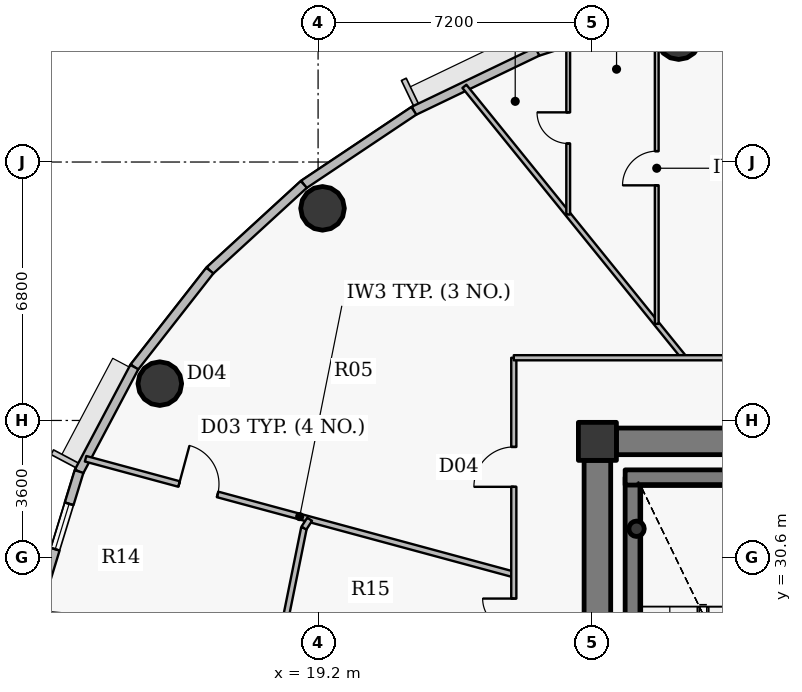
"""IFC4 building model, lengths in metres.
Left out: names, types, materials, properties, quantities, classifications, styles, units other than length and angle.
Written with IfcOpenShell. Run it as: python <this file> out.ifc"""

import sys

from ifc_helpers import new_model, si_unit, direction, frame, frame_2d, origin, origin_2d, place, context, subcontext, project, spatial, rectangle, hollow_circle, extrude, source, transform, mapped, element, fill, save


model = new_model("IFC4")
c1 = context("Model", 3, precision=1e-05, world=origin(), true_north=direction((0.0, 1.0)))
c2 = subcontext(c1, "Body", "Model", "MODEL_VIEW")
j1 = project(units=[si_unit("LENGTHUNIT", "METRE"), si_unit("PLANEANGLEUNIT", "RADIAN")], contexts=[c1])
p1 = place(None, origin())
s1 = spatial("IfcSite", under=j1, at=p1, CompositionType="ELEMENT")
p2 = place(p1, origin())
s2 = spatial("IfcBuilding", under=s1, at=p2, CompositionType="ELEMENT")
p3 = place(p2, frame((0.0, 0.0, 244.05)))
s3 = spatial("IfcBuildingStorey", under=s2, at=p3, CompositionType="ELEMENT", Elevation=244.05)
p4 = place(p3, frame((26.55, 33.65, 0.0), z_axis=(0.0, 0.0, 1.0), x_axis=(1.0, 0.0, 0.0)))
e1 = element("IfcColumn", 1, at=p4, inside=s3, PredefinedType="COLUMN", context=c2, shape_type="SweptSolid", body=[
    extrude(rectangle(XDim=1.0, YDim=1.0, at=origin_2d()), origin(), (0.0, 0.0, 1.0), 3.75),
])
p5 = place(p3, frame((27.48, 24.1, 0.0), z_axis=(0.0, 0.0, 1.0), x_axis=(0.0, 1.0, 0.0)))
e2 = element("IfcWall", 2, at=p5, inside=s3, PredefinedType="SHEAR", context=c2, shape_type="SweptSolid", body=[
    extrude(rectangle(XDim=8.6, YDim=0.4, at=frame_2d((4.3, 0.0))), origin(), (0.0, 0.0, 1.0), 3.75),
])
p6 = place(p3, frame((27.28, 32.7, 0.0), z_axis=(0.0, 0.0, 1.0), x_axis=(1.0, 0.0, 0.0)))
e3 = element("IfcWall", 3, at=p6, inside=s3, PredefinedType="SHEAR", context=c2, shape_type="SweptSolid", body=[
    extrude(rectangle(XDim=4.1, YDim=0.4, at=frame_2d((2.05, 0.0))), origin(), (0.0, 0.0, 1.0), 3.75),
])
p7 = place(p3, frame((27.58, 31.35, 0.0), z_axis=(0.0, 0.0, 1.0), x_axis=(1.0, 0.0, 0.0)))
e4 = element("IfcColumn", 4, at=p7, inside=s3, PredefinedType="COLUMN", context=c2, shape_type="SweptSolid", body=[
    extrude(hollow_circle(Radius=0.203, WallThickness=0.016, at=origin_2d()), origin(), (0.0, 0.0, 1.0), 3.75),
])
p8 = place(p3, frame((27.05, 33.65, 0.0), z_axis=(0.0, 0.0, 1.0), x_axis=(1.0, 0.0, 0.0)))
e5 = element("IfcWall", 5, at=p8, inside=s3, PredefinedType="SHEAR", context=c2, shape_type="SweptSolid", body=[
    extrude(rectangle(XDim=17.9, YDim=0.7, at=frame_2d((8.95, 0.0))), origin(), (0.0, 0.0, 1.0), 3.05),
])
p9 = place(p8, frame((13.675, 0.0, 0.0)))
e6 = element("IfcOpeningElement", 6, at=p9, cuts=e5, PredefinedType="OPENING", context=c2, shape_type="SweptSolid", body=[
    extrude(rectangle(XDim=1.15, YDim=2.15, at=origin_2d()), frame((0.575, 0.36, 1.075), z_axis=(0.0, -1.0, 0.0), x_axis=(1.0, 0.0, 0.0)), (0.0, 0.0, 1.0), 0.72),
])
p10 = place(p3, frame((26.55, 20.85, 0.0), z_axis=(0.0, 0.0, 1.0), x_axis=(0.0, 1.0, 0.0)))
e7 = element("IfcWall", 7, at=p10, inside=s3, PredefinedType="SHEAR", context=c2, shape_type="SweptSolid", body=[
    extrude(rectangle(XDim=12.3, YDim=0.7, at=frame_2d((6.15, 0.0))), origin(), (0.0, 0.0, 1.0), 3.05),
])
p11 = place(p10, frame((1.085, 0.0, 0.0)))
e8 = element("IfcOpeningElement", 8, at=p11, cuts=e7, PredefinedType="OPENING", context=c2, shape_type="SweptSolid", body=[
    extrude(rectangle(XDim=1.15, YDim=2.15, at=origin_2d()), frame((0.575, 0.36, 1.075), z_axis=(0.0, -1.0, 0.0), x_axis=(1.0, 0.0, 0.0)), (0.0, 0.0, 1.0), 0.72),
])
for number, where, z_axis, x_axis in (
    (9, (28.688, 44.273, 0.0), (0.0, 0.0, 1.0), (1.0, 0.0, 0.0)),
    (10, (19.317, 39.781, 0.0), (0.0, 0.0, 1.0), (1.0, 0.0, 0.0)),
    (11, (15.035, 35.169, 0.0), (0.0, 0.0, 1.0), (1.0, 0.0, 0.0)),
):
    element("IfcColumn", number, at=place(p3, frame(where, z_axis=z_axis, x_axis=x_axis)), inside=s3, PredefinedType="COLUMN", context=c2, shape_type="SweptSolid", body=[
        extrude(hollow_circle(Radius=0.575, WallThickness=0.036, at=origin_2d()), origin(), (0.0, 0.0, 1.0), 3.75),
    ])
p12 = place(p3, frame((24.969, 43.906, 0.0), z_axis=(0.0, 0.0, 1.0), x_axis=(0.951210789182, 0.308541787354, 0.0)))
e12 = element("IfcWall", 12, at=p12, inside=s3, PredefinedType="SOLIDWALL", context=c2, shape_type="SweptSolid", body=[
    extrude(rectangle(XDim=3.702, YDim=0.24, at=frame_2d((1.851, 0.0))), origin(), (0.0, 0.0, 1.0), 3.5),
])
p13 = place(p12, frame((1.223, 0.0, 0.9)))
e13 = element("IfcOpeningElement", 13, at=p13, cuts=e12, PredefinedType="OPENING", context=c2, shape_type="SweptSolid", body=[
    extrude(rectangle(XDim=1.25, YDim=1.65, at=origin_2d()), frame((0.625, 0.13, 0.825), z_axis=(0.0, -1.0, 0.0), x_axis=(1.0, 0.0, 0.0)), (0.0, 0.0, 1.0), 0.26),
])
p14 = place(p3, frame((21.72, 42.348, 0.0), z_axis=(0.0, 0.0, 1.0), x_axis=(0.901598104751, 0.432574684313, 0.0)))
e14 = element("IfcWall", 14, at=p14, inside=s3, PredefinedType="SOLIDWALL", context=c2, shape_type="SweptSolid", body=[
    extrude(rectangle(XDim=3.604, YDim=0.24, at=frame_2d((1.802, 0.0))), origin(), (0.0, 0.0, 1.0), 3.5),
])
p15 = place(p3, frame((18.824, 40.411, 0.0), z_axis=(0.0, 0.0, 1.0), x_axis=(0.831262496074, 0.555880079352, 0.0)))
e15 = element("IfcWall", 15, at=p15, inside=s3, PredefinedType="SOLIDWALL", context=c2, shape_type="SweptSolid", body=[
    extrude(rectangle(XDim=3.484, YDim=0.24, at=frame_2d((1.742, 0.0))), origin(), (0.0, 0.0, 1.0), 3.5),
])
p16 = place(p3, frame((16.352, 38.145, 0.0), z_axis=(0.0, 0.0, 1.0), x_axis=(0.737123922599, 0.675757591694, 0.0)))
e16 = element("IfcWall", 16, at=p16, inside=s3, PredefinedType="SOLIDWALL", context=c2, shape_type="SweptSolid", body=[
    extrude(rectangle(XDim=3.354, YDim=0.24, at=frame_2d((1.677, 0.0))), origin(), (0.0, 0.0, 1.0), 3.5),
])
p17 = place(p3, frame((14.364, 35.605, 0.0), z_axis=(0.0, 0.0, 1.0), x_axis=(0.616312344705, 0.787501805562, 0.0)))
e17 = element("IfcWall", 17, at=p17, inside=s3, PredefinedType="SOLIDWALL", context=c2, shape_type="SweptSolid", body=[
    extrude(rectangle(XDim=3.225, YDim=0.24, at=frame_2d((1.612, 0.0))), origin(), (0.0, 0.0, 1.0), 3.5),
])
p18 = place(p3, frame((12.91, 32.856, 0.0), z_axis=(0.0, 0.0, 1.0), x_axis=(0.46766049993, 0.883908172157, 0.0)))
e18 = element("IfcWall", 18, at=p18, inside=s3, PredefinedType="SOLIDWALL", context=c2, shape_type="SweptSolid", body=[
    extrude(rectangle(XDim=3.11, YDim=0.24, at=frame_2d((1.555, 0.0))), origin(), (0.0, 0.0, 1.0), 3.5),
])
p19 = place(p3, frame((12.023, 29.964, 0.0), z_axis=(0.0, 0.0, 1.0), x_axis=(0.293132907334, 0.95607170162, 0.0)))
e19 = element("IfcWall", 19, at=p19, inside=s3, PredefinedType="SOLIDWALL", context=c2, shape_type="SweptSolid", body=[
    extrude(rectangle(XDim=3.025, YDim=0.24, at=frame_2d((1.512, 0.0))), origin(), (0.0, 0.0, 1.0), 3.5),
])
p20 = place(p19, frame((0.887, 0.0, 0.9)))
e20 = element("IfcOpeningElement", 20, at=p20, cuts=e19, PredefinedType="OPENING", context=c2, shape_type="SweptSolid", body=[
    extrude(rectangle(XDim=1.25, YDim=1.65, at=origin_2d()), frame((0.625, 0.13, 0.825), z_axis=(0.0, -1.0, 0.0), x_axis=(1.0, 0.0, 0.0)), (0.0, 0.0, 1.0), 0.26),
])
p21 = place(p3, frame((11.932, 29.106, 0.0), z_axis=(0.0, 0.0, 1.0), x_axis=(0.996194886619, -0.08715358784, 0.0)))
e21 = element("IfcWall", 21, at=p21, inside=s3, PredefinedType="PARTITIONING", context=c2, shape_type="SweptSolid", body=[
    extrude(rectangle(XDim=12.466, YDim=0.135, at=frame_2d((6.233, 0.0))), origin(), (0.0, 0.0, 1.0), 2.985),
])
p22 = place(p3, frame((13.082, 33.192, 0.0), z_axis=(0.0, 0.0, 1.0), x_axis=(0.965379480797, -0.26084949311, 0.0)))
e22 = element("IfcWall", 22, at=p22, inside=s3, PredefinedType="PARTITIONING", context=c2, shape_type="SweptSolid", body=[
    extrude(rectangle(XDim=11.672, YDim=0.15, at=frame_2d((5.836, 0.0))), origin(), (0.0, 0.0, 1.0), 2.985),
])
p23 = place(p22, frame((2.549, 0.0, 0.0)))
e23 = element("IfcOpeningElement", 23, at=p23, cuts=e22, PredefinedType="OPENING", context=c2, shape_type="SweptSolid", body=[
    extrude(rectangle(XDim=1.05, YDim=2.15, at=origin_2d()), frame((0.525, 0.085, 1.075), z_axis=(0.0, -1.0, 0.0), x_axis=(1.0, 0.0, 0.0)), (0.0, 0.0, 1.0), 0.17),
])
p24 = place(p3, frame((18.258, 28.552, 0.0), z_axis=(0.0, 0.0, 1.0), x_axis=(0.198206962436, 0.980160191011, 0.0)))
e24 = element("IfcWall", 24, at=p24, inside=s3, PredefinedType="PARTITIONING", context=c2, shape_type="SweptSolid", body=[
    extrude(rectangle(XDim=2.874, YDim=0.15, at=frame_2d((1.437, 0.0))), origin(), (0.0, 0.0, 1.0), 3.5),
])
p25 = place(p3, frame((18.828, 31.369, 0.0), z_axis=(0.0, 0.0, 1.0), x_axis=(0.545861595592, 0.837875359739, 0.0)))
e25 = element("IfcWall", 25, at=p25, inside=s3, PredefinedType="PARTITIONING", context=c2, shape_type="SweptSolid", body=[
    extrude(rectangle(XDim=0.275, YDim=0.15, at=frame_2d((0.138, 0.0))), origin(), (0.0, 0.0, 1.0), 3.5),
])
p26 = place(p3, frame((23.05, 42.991, 0.0), z_axis=(0.0, 0.0, 1.0), x_axis=(0.629320507303, -0.777145867317, 0.0)))
e26 = element("IfcWall", 26, at=p26, inside=s3, PredefinedType="PARTITIONING", context=c2, shape_type="SweptSolid", body=[
    extrude(rectangle(XDim=9.189, YDim=0.135, at=frame_2d((4.595, 0.0))), origin(), (0.0, 0.0, 1.0), 2.985),
])
p27 = place(p3, frame((24.35, 28.019, 0.0), z_axis=(0.0, 0.0, 1.0), x_axis=(0.0, 1.0, 0.0)))
e27 = element("IfcWall", 27, at=p27, inside=s3, PredefinedType="PARTITIONING", context=c2, shape_type="SweptSolid", body=[
    extrude(rectangle(XDim=7.831, YDim=0.135, at=frame_2d((3.916, 0.0))), origin(), (0.0, 0.0, 1.0), 2.935),
])
p28 = place(p27, frame((4.435, 0.0, 0.0)))
e28 = element("IfcOpeningElement", 28, at=p28, cuts=e27, PredefinedType="OPENING", context=c2, shape_type="SweptSolid", body=[
    extrude(rectangle(XDim=1.05, YDim=2.15, at=origin_2d()), frame((0.525, 0.078, 1.075), z_axis=(0.0, -1.0, 0.0), x_axis=(1.0, 0.0, 0.0)), (0.0, 0.0, 1.0), 0.155),
])
p29 = place(p27, frame((0.674, 0.0, 0.0)))
e29 = element("IfcOpeningElement", 29, at=p29, cuts=e27, PredefinedType="OPENING", context=c2, shape_type="SweptSolid", body=[
    extrude(rectangle(XDim=0.82, YDim=2.1, at=origin_2d()), frame((0.41, 0.078, 1.05), z_axis=(0.0, -1.0, 0.0), x_axis=(1.0, 0.0, 0.0)), (0.0, 0.0, 1.0), 0.155),
])
p30 = place(p3, frame((24.35, 35.85, 0.0), z_axis=(0.0, 0.0, 1.0), x_axis=(1.0, 0.0, 0.0)))
e30 = element("IfcWall", 30, at=p30, inside=s3, PredefinedType="PARTITIONING", context=c2, shape_type="SweptSolid", body=[
    extrude(rectangle(XDim=26.218, YDim=0.135, at=frame_2d((13.109, 0.0))), origin(), (0.0, 0.0, 1.0), 2.935),
])
p31 = place(p30, frame((22.062, 0.0, 0.0)))
e31 = element("IfcOpeningElement", 31, at=p31, cuts=e30, PredefinedType="OPENING", context=c2, shape_type="SweptSolid", body=[
    extrude(rectangle(XDim=1.0, YDim=2.15, at=origin_2d()), frame((0.5, 0.078, 1.075), z_axis=(0.0, -1.0, 0.0), x_axis=(1.0, 0.0, 0.0)), (0.0, 0.0, 1.0), 0.155),
])
p32 = place(p30, frame((11.214, 0.0, 0.0)))
e32 = element("IfcOpeningElement", 32, at=p32, cuts=e30, PredefinedType="OPENING", context=c2, shape_type="SweptSolid", body=[
    extrude(rectangle(XDim=1.0, YDim=2.15, at=origin_2d()), frame((0.5, 0.078, 1.075), z_axis=(0.0, -1.0, 0.0), x_axis=(1.0, 0.0, 0.0)), (0.0, 0.0, 1.0), 0.155),
])
p33 = place(p3, frame((25.782, 39.619, 0.0), z_axis=(0.0, 0.0, 1.0), x_axis=(0.0, 1.0, 0.0)))
e33 = element("IfcWall", 33, at=p33, inside=s3, PredefinedType="PARTITIONING", context=c2, shape_type="SweptSolid", body=[
    extrude(rectangle(XDim=4.557, YDim=0.1, at=frame_2d((2.278, 0.0))), origin(), (0.0, 0.0, 1.0), 2.985),
])
p34 = place(p33, frame((1.868, 0.0, 0.0)))
e34 = element("IfcOpeningElement", 34, at=p34, cuts=e33, PredefinedType="OPENING", context=c2, shape_type="SweptSolid", body=[
    extrude(rectangle(XDim=0.82, YDim=2.1, at=origin_2d()), frame((0.41, 0.06, 1.05), z_axis=(0.0, -1.0, 0.0), x_axis=(1.0, 0.0, 0.0)), (0.0, 0.0, 1.0), 0.12),
])
p35 = place(p3, frame((28.111, 36.742, 0.0), z_axis=(0.0, 0.0, 1.0), x_axis=(0.0, 1.0, 0.0)))
e35 = element("IfcWall", 35, at=p35, inside=s3, PredefinedType="PARTITIONING", context=c2, shape_type="SweptSolid", body=[
    extrude(rectangle(XDim=8.189, YDim=0.1, at=frame_2d((4.095, 0.0))), origin(), (0.0, 0.0, 1.0), 2.985),
])
p36 = place(p35, frame((3.645, 0.0, 0.0)))
e36 = element("IfcOpeningElement", 36, at=p36, cuts=e35, PredefinedType="OPENING", context=c2, shape_type="SweptSolid", body=[
    extrude(rectangle(XDim=0.9, YDim=2.1, at=origin_2d()), frame((0.45, 0.06, 1.05), z_axis=(0.0, -1.0, 0.0), x_axis=(1.0, 0.0, 0.0)), (0.0, 0.0, 1.0), 0.12),
])
p37 = place(p3, frame((27.04, 34.0, 0.0), z_axis=(0.0, 0.0, 1.0), x_axis=(-1.0, 0.0, 0.0)))
e37 = element("IfcWall", 37, at=p37, inside=s3, PredefinedType="PARTITIONING", context=c2, shape_type="SweptSolid", body=[
    extrude(rectangle(XDim=0.84, YDim=0.135, at=frame_2d((0.42, 0.0))), origin(), (0.0, 0.0, 1.0), 2.935),
])
p38 = place(p3, frame((26.2, 33.692, 0.0), z_axis=(0.0, 0.0, 1.0), x_axis=(0.0, -1.0, 0.0)))
e38 = element("IfcWall", 38, at=p38, inside=s3, PredefinedType="PARTITIONING", context=c2, shape_type="SweptSolid", body=[
    extrude(rectangle(XDim=0.532, YDim=0.135, at=frame_2d((0.266, 0.0))), origin(), (0.0, 0.0, 1.0), 3.5),
])
m1 = source(origin(), c2, "Body", "SweptSolid", [
    extrude(rectangle(XDim=1.25, YDim=1.65, at=origin_2d()), frame((0.625, 0.03, 0.825), z_axis=(0.0, -1.0, 0.0), x_axis=(1.0, 0.0, 0.0)), (0.0, 0.0, 1.0), 0.06),
])
p39 = place(p20, origin())
e39 = element("IfcWindow", 39, at=p39, inside=s3, PartitioningType="SINGLE_PANEL", PredefinedType="WINDOW", context=c2, shape_type="MappedRepresentation", body=[
    mapped(m1, transform((0.0, 0.0, 0.0), x_axis=(1.0, 0.0, 0.0), y_axis=(0.0, 1.0, 0.0), z_axis=(0.0, 0.0, 1.0), scale=1.0)),
])
fill(e20, e39)
m2 = source(origin(), c2, "Body", "SweptSolid", [
    extrude(rectangle(XDim=0.9, YDim=2.1, at=origin_2d()), frame((0.45, 0.025, 1.05), z_axis=(0.0, -1.0, 0.0), x_axis=(1.0, 0.0, 0.0)), (0.0, 0.0, 1.0), 0.05),
])
p40 = place(p36, origin())
e40 = element("IfcDoor", 40, at=p40, inside=s3, OperationType="SINGLE_SWING_LEFT", PredefinedType="DOOR", context=c2, shape_type="MappedRepresentation", body=[
    mapped(m2, transform((0.0, 0.0, 0.0), x_axis=(1.0, 0.0, 0.0), y_axis=(0.0, 1.0, 0.0), z_axis=(0.0, 0.0, 1.0), scale=1.0)),
])
fill(e36, e40)
m3 = source(origin(), c2, "Body", "SweptSolid", [
    extrude(rectangle(XDim=0.82, YDim=2.1, at=origin_2d()), frame((0.41, 0.025, 1.05), z_axis=(0.0, -1.0, 0.0), x_axis=(1.0, 0.0, 0.0)), (0.0, 0.0, 1.0), 0.05),
])
p41 = place(p34, origin())
e41 = element("IfcDoor", 41, at=p41, inside=s3, OperationType="SINGLE_SWING_RIGHT", PredefinedType="DOOR", context=c2, shape_type="MappedRepresentation", body=[
    mapped(m3, transform((0.0, 0.0, 0.0), x_axis=(1.0, 0.0, 0.0), y_axis=(0.0, 1.0, 0.0), z_axis=(0.0, 0.0, 1.0), scale=1.0)),
])
fill(e34, e41)
m4 = source(origin(), c2, "Body", "SweptSolid", [
    extrude(rectangle(XDim=1.05, YDim=2.15, at=origin_2d()), frame((0.525, 0.025, 1.075), z_axis=(0.0, -1.0, 0.0), x_axis=(1.0, 0.0, 0.0)), (0.0, 0.0, 1.0), 0.05),
])
p42 = place(p28, origin())
e42 = element("IfcDoor", 42, at=p42, inside=s3, OperationType="SINGLE_SWING_LEFT", PredefinedType="DOOR", context=c2, shape_type="MappedRepresentation", body=[
    mapped(m4, transform((0.0, 0.0, 0.0), x_axis=(1.0, 0.0, 0.0), y_axis=(0.0, 1.0, 0.0), z_axis=(0.0, 0.0, 1.0), scale=1.0)),
])
fill(e28, e42)
p43 = place(p29, origin())
e43 = element("IfcDoor", 43, at=p43, inside=s3, OperationType="SINGLE_SWING_RIGHT", PredefinedType="DOOR", context=c2, shape_type="MappedRepresentation", body=[
    mapped(m3, transform((0.0, 0.0, 0.0), x_axis=(1.0, 0.0, 0.0), y_axis=(0.0, 1.0, 0.0), z_axis=(0.0, 0.0, 1.0), scale=1.0)),
])
fill(e29, e43)
p44 = place(p23, origin())
e44 = element("IfcDoor", 44, at=p44, inside=s3, OperationType="SINGLE_SWING_LEFT", PredefinedType="DOOR", context=c2, shape_type="MappedRepresentation", body=[
    mapped(m4, transform((0.0, 0.0, 0.0), x_axis=(1.0, 0.0, 0.0), y_axis=(0.0, 1.0, 0.0), z_axis=(0.0, 0.0, 1.0), scale=1.0)),
])
fill(e23, e44)
save(model, sys.argv[1])
